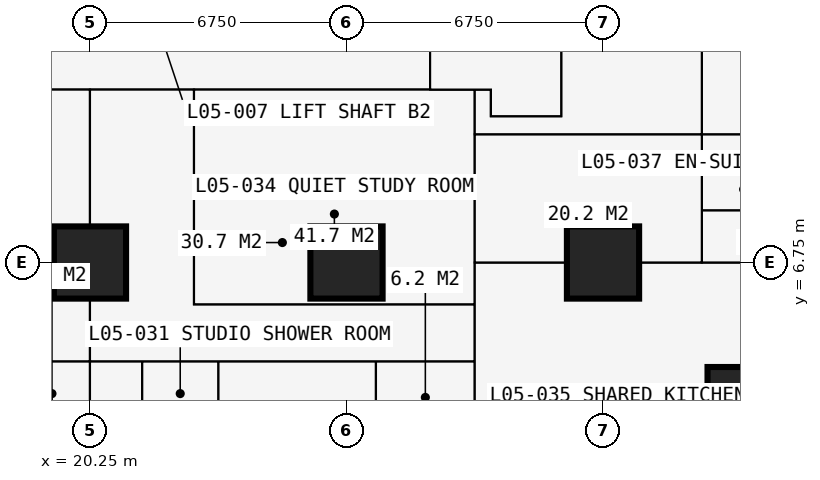
"""IFC4 building model, lengths in metres.
Left out: names, types, materials, properties, quantities, classifications, styles, units other than length and angle.
Written with IfcOpenShell. Run it as: python <this file> out.ifc"""

import sys

from ifc_helpers import new_model, si_unit, direction, frame, frame_2d, origin, origin_2d, place, context, subcontext, project, spatial, rectangle, extrude, element, fill, save


model = new_model("IFC4")
c1 = context("Model", 3, precision=1e-05, world=origin(), true_north=direction((0.0, 1.0)))
c2 = subcontext(c1, "Body", "Model", "MODEL_VIEW")
j1 = project(units=[si_unit("LENGTHUNIT", "METRE"), si_unit("PLANEANGLEUNIT", "RADIAN")], contexts=[c1])
p1 = place(None, origin())
s1 = spatial("IfcSite", under=j1, at=p1, CompositionType="ELEMENT")
p2 = place(p1, origin())
s2 = spatial("IfcBuilding", under=s1, at=p2, CompositionType="ELEMENT")
p3 = place(p2, frame((0.0, 0.0, 21.6)))
s3 = spatial("IfcBuildingStorey", under=s2, at=p3, CompositionType="ELEMENT", Elevation=21.6)
for number, where, z_axis, x_axis in (
    (1, (20.25, 6.75, 0.0), (0.0, 0.0, 1.0), (1.0, 0.0, 0.0)),
    (2, (27.0, 6.75, 0.0), (0.0, 0.0, 1.0), (1.0, 0.0, 0.0)),
    (3, (33.75, 6.75, 0.0), (0.0, 0.0, 1.0), (1.0, 0.0, 0.0)),
):
    element("IfcColumn", number, at=place(p3, frame(where, z_axis=z_axis, x_axis=x_axis)), inside=s3, PredefinedType="COLUMN", context=c2, shape_type="SweptSolid", body=[
        extrude(rectangle(XDim=1.9, YDim=1.9, at=origin_2d()), origin(), (0.0, 0.0, 1.0), 3.6),
    ])
p4 = place(p3, frame((37.125, 3.375, 0.0), z_axis=(0.0, 0.0, 1.0), x_axis=(1.0, 0.0, 0.0)))
e4 = element("IfcColumn", 4, at=p4, inside=s3, PredefinedType="COLUMN", context=c2, shape_type="SweptSolid", body=[
    extrude(rectangle(XDim=1.25, YDim=1.25, at=origin_2d()), origin(), (0.0, 0.0, 1.0), 3.6),
])
p5 = place(p3, frame((6.75, 4.15, 0.0), z_axis=(0.0, 0.0, 1.0), x_axis=(1.0, 0.0, 0.0)))
e5 = element("IfcWall", 5, at=p5, inside=s3, PredefinedType="PARTITIONING", context=c2, shape_type="SweptSolid", body=[
    extrude(rectangle(XDim=23.625, YDim=0.1, at=frame_2d((11.812, 0.0))), origin(), (0.0, 0.0, 1.0), 3.375),
])
p6 = place(p5, frame((0.2, 0.0, 0.0)))
e6 = element("IfcOpeningElement", 6, at=p6, cuts=e5, PredefinedType="OPENING", context=c2, shape_type="SweptSolid", body=[
    extrude(rectangle(XDim=0.95, YDim=2.2, at=frame_2d((0.475, 1.1))), frame((0.0, 0.06, 0.0), z_axis=(0.0, -1.0, 0.0), x_axis=(1.0, 0.0, 0.0)), (0.0, 0.0, 1.0), 0.12),
])
p7 = place(p5, frame((3.625, 0.0, 0.0)))
e7 = element("IfcOpeningElement", 7, at=p7, cuts=e5, PredefinedType="OPENING", context=c2, shape_type="SweptSolid", body=[
    extrude(rectangle(XDim=0.95, YDim=2.2, at=frame_2d((0.475, 1.1))), frame((0.0, 0.06, 0.0), z_axis=(0.0, -1.0, 0.0), x_axis=(1.0, 0.0, 0.0)), (0.0, 0.0, 1.0), 0.12),
])
p8 = place(p5, frame((7.0, 0.0, 0.0)))
e8 = element("IfcOpeningElement", 8, at=p8, cuts=e5, PredefinedType="OPENING", context=c2, shape_type="SweptSolid", body=[
    extrude(rectangle(XDim=0.95, YDim=2.2, at=frame_2d((0.475, 1.1))), frame((0.0, 0.06, 0.0), z_axis=(0.0, -1.0, 0.0), x_axis=(1.0, 0.0, 0.0)), (0.0, 0.0, 1.0), 0.12),
])
p9 = place(p5, frame((10.375, 0.0, 0.0)))
e9 = element("IfcOpeningElement", 9, at=p9, cuts=e5, PredefinedType="OPENING", context=c2, shape_type="SweptSolid", body=[
    extrude(rectangle(XDim=0.95, YDim=2.2, at=frame_2d((0.475, 1.1))), frame((0.0, 0.06, 0.0), z_axis=(0.0, -1.0, 0.0), x_axis=(1.0, 0.0, 0.0)), (0.0, 0.0, 1.0), 0.12),
])
p10 = place(p5, frame((18.475, 0.0, 0.0)))
e10 = element("IfcOpeningElement", 10, at=p10, cuts=e5, PredefinedType="OPENING", context=c2, shape_type="SweptSolid", body=[
    extrude(rectangle(XDim=0.95, YDim=2.2, at=frame_2d((0.475, 1.1))), frame((0.0, 0.06, 0.0), z_axis=(0.0, -1.0, 0.0), x_axis=(1.0, 0.0, 0.0)), (0.0, 0.0, 1.0), 0.12),
])
p11 = place(p5, frame((13.7, 0.0, 0.0)))
e11 = element("IfcOpeningElement", 11, at=p11, cuts=e5, PredefinedType="OPENING", context=c2, shape_type="SweptSolid", body=[
    extrude(rectangle(XDim=0.95, YDim=2.2, at=frame_2d((0.475, 1.1))), frame((0.0, 0.06, 0.0), z_axis=(0.0, -1.0, 0.0), x_axis=(1.0, 0.0, 0.0)), (0.0, 0.0, 1.0), 0.12),
])
p12 = place(p3, frame((10.125, 11.3, 0.0), z_axis=(0.0, 0.0, 1.0), x_axis=(1.0, 0.0, 0.0)))
e12 = element("IfcWall", 12, at=p12, inside=s3, PredefinedType="PARTITIONING", context=c2, shape_type="SweptSolid", body=[
    extrude(rectangle(XDim=20.675, YDim=0.15, at=frame_2d((10.337, 0.0))), origin(), (0.0, 0.0, 1.0), 3.375),
])
p13 = place(p12, frame((8.375, 0.0, 0.0)))
e13 = element("IfcOpeningElement", 13, at=p13, cuts=e12, PredefinedType="OPENING", context=c2, shape_type="SweptSolid", body=[
    extrude(rectangle(XDim=1.0, YDim=2.2, at=frame_2d((0.5, 1.1))), frame((0.0, 0.085, 0.0), z_axis=(0.0, -1.0, 0.0), x_axis=(1.0, 0.0, 0.0)), (0.0, 0.0, 1.0), 0.17),
])
p14 = place(p12, frame((10.975, 0.0, 0.0)))
e14 = element("IfcOpeningElement", 14, at=p14, cuts=e12, PredefinedType="OPENING", context=c2, shape_type="SweptSolid", body=[
    extrude(rectangle(XDim=1.0, YDim=2.2, at=frame_2d((0.5, 1.1))), frame((0.0, 0.085, 0.0), z_axis=(0.0, -1.0, 0.0), x_axis=(1.0, 0.0, 0.0)), (0.0, 0.0, 1.0), 0.17),
])
p15 = place(p12, frame((3.925, 0.0, 0.0)))
e15 = element("IfcOpeningElement", 15, at=p15, cuts=e12, PredefinedType="OPENING", context=c2, shape_type="SweptSolid", body=[
    extrude(rectangle(XDim=0.95, YDim=2.2, at=frame_2d((0.475, 1.1))), frame((0.0, 0.085, 0.0), z_axis=(0.0, -1.0, 0.0), x_axis=(1.0, 0.0, 0.0)), (0.0, 0.0, 1.0), 0.17),
])
p16 = place(p3, frame((20.25, -0.734, 0.0), z_axis=(0.0, 0.0, 1.0), x_axis=(0.0, 1.0, 0.0)))
e16 = element("IfcWall", 16, at=p16, inside=s3, PredefinedType="PARTITIONING", context=c2, shape_type="SweptSolid", body=[
    extrude(rectangle(XDim=12.034, YDim=0.15, at=frame_2d((6.017, 0.0))), origin(), (0.0, 0.0, 1.0), 2.61),
])
p17 = place(p3, frame((21.625, 1.95, 0.0), z_axis=(0.0, 0.0, 1.0), x_axis=(0.0, 1.0, 0.0)))
e17 = element("IfcWall", 17, at=p17, inside=s3, PredefinedType="PARTITIONING", context=c2, shape_type="SweptSolid", body=[
    extrude(rectangle(XDim=2.2, YDim=0.1, at=frame_2d((1.1, 0.0))), origin(), (0.0, 0.0, 1.0), 3.375),
])
p18 = place(p3, frame((22.988, 5.65, 0.0), z_axis=(0.0, 0.0, 1.0), x_axis=(1.0, 0.0, 0.0)))
e18 = element("IfcWall", 18, at=p18, inside=s3, PredefinedType="PARTITIONING", context=c2, shape_type="SweptSolid", body=[
    extrude(rectangle(XDim=7.387, YDim=0.15, at=frame_2d((3.694, 0.0))), origin(), (0.0, 0.0, 1.0), 3.375),
])
p19 = place(p18, frame((2.1, 0.0, 0.0)))
e19 = element("IfcOpeningElement", 19, at=p19, cuts=e18, PredefinedType="OPENING", context=c2, shape_type="SweptSolid", body=[
    extrude(rectangle(XDim=0.95, YDim=2.2, at=frame_2d((0.475, 1.1))), frame((0.0, 0.085, 0.0), z_axis=(0.0, -1.0, 0.0), x_axis=(1.0, 0.0, 0.0)), (0.0, 0.0, 1.0), 0.17),
])
p20 = place(p3, frame((22.988, 5.65, 0.0), z_axis=(0.0, 0.0, 1.0), x_axis=(0.0, 1.0, 0.0)))
e20 = element("IfcWall", 20, at=p20, inside=s3, PredefinedType="PARTITIONING", context=c2, shape_type="SweptSolid", body=[
    extrude(rectangle(XDim=5.65, YDim=0.15, at=frame_2d((2.825, 0.0))), origin(), (0.0, 0.0, 1.0), 3.375),
])
p21 = place(p3, frame((23.625, -0.734, 0.0), z_axis=(0.0, 0.0, 1.0), x_axis=(0.0, 1.0, 0.0)))
e21 = element("IfcWall", 21, at=p21, inside=s3, PredefinedType="PARTITIONING", context=c2, shape_type="SweptSolid", body=[
    extrude(rectangle(XDim=4.884, YDim=0.175, at=frame_2d((2.442, 0.0))), origin(), (0.0, 0.0, 1.0), 3.375),
])
p22 = place(p21, frame((3.334, 0.0, 0.0)))
e22 = element("IfcOpeningElement", 22, at=p22, cuts=e21, PredefinedType="OPENING", context=c2, shape_type="SweptSolid", body=[
    extrude(rectangle(XDim=0.9, YDim=2.2, at=frame_2d((0.45, 1.1))), frame((0.0, 0.097, 0.0), z_axis=(0.0, -1.0, 0.0), x_axis=(1.0, 0.0, 0.0)), (0.0, 0.0, 1.0), 0.195),
])
p23 = place(p3, frame((27.775, 1.75, 0.0), z_axis=(0.0, 0.0, 1.0), x_axis=(0.0, 1.0, 0.0)))
e23 = element("IfcWall", 23, at=p23, inside=s3, PredefinedType="PARTITIONING", context=c2, shape_type="SweptSolid", body=[
    extrude(rectangle(XDim=2.4, YDim=0.1, at=frame_2d((1.2, 0.0))), origin(), (0.0, 0.0, 1.0), 3.375),
])
p24 = place(p3, frame((29.2, 11.3, 0.0), z_axis=(0.0, 0.0, 1.0), x_axis=(0.0, 1.0, 0.0)))
e24 = element("IfcWall", 24, at=p24, inside=s3, PredefinedType="PARTITIONING", context=c2, shape_type="SweptSolid", body=[
    extrude(rectangle(XDim=17.9, YDim=0.2, at=frame_2d((8.95, 0.0))), origin(), (0.0, 0.0, 1.0), 3.375),
])
p25 = place(p24, frame((8.35, 0.0, 0.0)))
e25 = element("IfcOpeningElement", 25, at=p25, cuts=e24, PredefinedType="OPENING", context=c2, shape_type="SweptSolid", body=[
    extrude(rectangle(XDim=1.2, YDim=2.2, at=frame_2d((0.6, 1.1))), frame((0.0, 0.11, 0.0), z_axis=(0.0, -1.0, 0.0), x_axis=(1.0, 0.0, 0.0)), (0.0, 0.0, 1.0), 0.22),
])
p26 = place(p3, frame((30.375, -0.734, 0.0), z_axis=(0.0, 0.0, 1.0), x_axis=(0.0, 1.0, 0.0)))
e26 = element("IfcWall", 26, at=p26, inside=s3, PredefinedType="PARTITIONING", context=c2, shape_type="SweptSolid", body=[
    extrude(rectangle(XDim=12.034, YDim=0.15, at=frame_2d((6.017, 0.0))), origin(), (0.0, 0.0, 1.0), 3.375),
])
p27 = place(p3, frame((30.375, 6.75, 0.0), z_axis=(0.0, 0.0, 1.0), x_axis=(1.0, 0.0, 0.0)))
e27 = element("IfcWall", 27, at=p27, inside=s3, PredefinedType="PARTITIONING", context=c2, shape_type="SweptSolid", body=[
    extrude(rectangle(XDim=10.859, YDim=0.15, at=frame_2d((5.429, 0.0))), origin(), (0.0, 0.0, 1.0), 2.877),
])
p28 = place(p27, frame((1.4, 0.0, 0.0)))
e28 = element("IfcOpeningElement", 28, at=p28, cuts=e27, PredefinedType="OPENING", context=c2, shape_type="SweptSolid", body=[
    extrude(rectangle(XDim=1.0, YDim=2.2, at=frame_2d((0.5, 1.1))), frame((0.0, 0.085, 0.0), z_axis=(0.0, -1.0, 0.0), x_axis=(1.0, 0.0, 0.0)), (0.0, 0.0, 1.0), 0.17),
])
p29 = place(p3, frame((30.375, 10.125, 0.0), z_axis=(0.0, 0.0, 1.0), x_axis=(1.0, 0.0, 0.0)))
e29 = element("IfcWall", 29, at=p29, inside=s3, PredefinedType="PARTITIONING", context=c2, shape_type="SweptSolid", body=[
    extrude(rectangle(XDim=10.859, YDim=0.15, at=frame_2d((5.429, 0.0))), origin(), (0.0, 0.0, 1.0), 3.375),
])
p30 = place(p29, frame((2.5, 0.0, 0.0)))
e30 = element("IfcOpeningElement", 30, at=p30, cuts=e29, PredefinedType="OPENING", context=c2, shape_type="SweptSolid", body=[
    extrude(rectangle(XDim=1.0, YDim=2.2, at=frame_2d((0.5, 1.1))), frame((0.0, 0.085, 0.0), z_axis=(0.0, -1.0, 0.0), x_axis=(1.0, 0.0, 0.0)), (0.0, 0.0, 1.0), 0.17),
])
p31 = place(p3, frame((30.8, 10.6, 0.0), z_axis=(0.0, 0.0, 1.0), x_axis=(0.0, 1.0, 0.0)))
e31 = element("IfcWall", 31, at=p31, inside=s3, PredefinedType="PARTITIONING", context=c2, shape_type="SweptSolid", body=[
    extrude(rectangle(XDim=0.7, YDim=0.15, at=frame_2d((0.35, 0.0))), origin(), (0.0, 0.0, 1.0), 3.375),
])
p32 = place(p3, frame((30.8, 10.6, 0.0), z_axis=(0.0, 0.0, 1.0), x_axis=(1.0, 0.0, 0.0)))
e32 = element("IfcWall", 32, at=p32, inside=s3, PredefinedType="PARTITIONING", context=c2, shape_type="SweptSolid", body=[
    extrude(rectangle(XDim=1.85, YDim=0.15, at=frame_2d((0.925, 0.0))), origin(), (0.0, 0.0, 1.0), 3.375),
])
p33 = place(p3, frame((32.65, 10.6, 0.0), z_axis=(0.0, 0.0, 1.0), x_axis=(0.0, 1.0, 0.0)))
e33 = element("IfcWall", 33, at=p33, inside=s3, PredefinedType="SHEAR", context=c2, shape_type="SweptSolid", body=[
    extrude(rectangle(XDim=9.3, YDim=0.1, at=frame_2d((4.65, 0.0))), origin(), (0.0, 0.0, 1.0), 3.375),
])
p34 = place(p33, frame((0.5, 0.0, 0.0)))
e34 = element("IfcOpeningElement", 34, at=p34, cuts=e33, PredefinedType="OPENING", context=c2, shape_type="SweptSolid", body=[
    extrude(rectangle(XDim=1.0, YDim=2.2, at=frame_2d((0.5, 1.1))), frame((0.0, 0.06, 0.0), z_axis=(0.0, -1.0, 0.0), x_axis=(1.0, 0.0, 0.0)), (0.0, 0.0, 1.0), 0.12),
])
p35 = place(p3, frame((36.35, 6.75, 0.0), z_axis=(0.0, 0.0, 1.0), x_axis=(0.0, 1.0, 0.0)))
e35 = element("IfcWall", 35, at=p35, inside=s3, PredefinedType="PARTITIONING", context=c2, shape_type="SweptSolid", body=[
    extrude(rectangle(XDim=23.625, YDim=0.15, at=frame_2d((11.812, 0.0))), origin(), (0.0, 0.0, 1.0), 3.375),
])
p36 = place(p35, frame((0.2, 0.0, 0.0)))
e36 = element("IfcOpeningElement", 36, at=p36, cuts=e35, PredefinedType="OPENING", context=c2, shape_type="SweptSolid", body=[
    extrude(rectangle(XDim=0.95, YDim=2.2, at=frame_2d((0.475, 1.1))), frame((0.0, 0.085, 0.0), z_axis=(0.0, -1.0, 0.0), x_axis=(1.0, 0.0, 0.0)), (0.0, 0.0, 1.0), 0.17),
])
p37 = place(p35, frame((18.475, 0.0, 0.0)))
e37 = element("IfcOpeningElement", 37, at=p37, cuts=e35, PredefinedType="OPENING", context=c2, shape_type="SweptSolid", body=[
    extrude(rectangle(XDim=0.95, YDim=2.2, at=frame_2d((0.475, 1.1))), frame((0.0, 0.085, 0.0), z_axis=(0.0, -1.0, 0.0), x_axis=(1.0, 0.0, 0.0)), (0.0, 0.0, 1.0), 0.17),
])
p38 = place(p35, frame((11.725, 0.0, 0.0)))
e38 = element("IfcOpeningElement", 38, at=p38, cuts=e35, PredefinedType="OPENING", context=c2, shape_type="SweptSolid", body=[
    extrude(rectangle(XDim=0.95, YDim=2.2, at=frame_2d((0.475, 1.1))), frame((0.0, 0.085, 0.0), z_axis=(0.0, -1.0, 0.0), x_axis=(1.0, 0.0, 0.0)), (0.0, 0.0, 1.0), 0.17),
])
p39 = place(p35, frame((4.975, 0.0, 0.0)))
e39 = element("IfcOpeningElement", 39, at=p39, cuts=e35, PredefinedType="OPENING", context=c2, shape_type="SweptSolid", body=[
    extrude(rectangle(XDim=0.95, YDim=2.2, at=frame_2d((0.475, 1.1))), frame((0.0, 0.085, 0.0), z_axis=(0.0, -1.0, 0.0), x_axis=(1.0, 0.0, 0.0)), (0.0, 0.0, 1.0), 0.17),
])
p40 = place(p3, frame((36.35, 8.125, 0.0), z_axis=(0.0, 0.0, 1.0), x_axis=(1.0, 0.0, 0.0)))
e40 = element("IfcWall", 40, at=p40, inside=s3, PredefinedType="PARTITIONING", context=c2, shape_type="SweptSolid", body=[
    extrude(rectangle(XDim=2.2, YDim=0.1, at=frame_2d((1.1, 0.0))), origin(), (0.0, 0.0, 1.0), 3.375),
])
p41 = place(p40, frame((0.65, 0.0, 0.0)))
e41 = element("IfcOpeningElement", 41, at=p41, cuts=e40, PredefinedType="OPENING", context=c2, shape_type="SweptSolid", body=[
    extrude(rectangle(XDim=0.9, YDim=2.2, at=frame_2d((0.45, 1.1))), frame((0.0, 0.06, 0.0), z_axis=(0.0, -1.0, 0.0), x_axis=(1.0, 0.0, 0.0)), (0.0, 0.0, 1.0), 0.12),
])
p42 = place(p13, origin())
e42 = element("IfcDoor", 42, at=p42, inside=s3, OperationType="SINGLE_SWING_LEFT", PredefinedType="DOOR", context=c2, shape_type="SweptSolid", body=[
    extrude(rectangle(XDim=1.0, YDim=2.2, at=frame_2d((0.5, 1.1))), frame((0.0, 0.025, 0.0), z_axis=(0.0, -1.0, 0.0), x_axis=(1.0, 0.0, 0.0)), (0.0, 0.0, 1.0), 0.05),
])
fill(e13, e42)
p43 = place(p10, origin())
e43 = element("IfcDoor", 43, at=p43, inside=s3, OperationType="SINGLE_SWING_LEFT", PredefinedType="DOOR", context=c2, shape_type="SweptSolid", body=[
    extrude(rectangle(XDim=0.95, YDim=2.2, at=frame_2d((0.475, 1.1))), frame((0.0, 0.025, 0.0), z_axis=(0.0, -1.0, 0.0), x_axis=(1.0, 0.0, 0.0)), (0.0, 0.0, 1.0), 0.05),
])
fill(e10, e43)
p44 = place(p11, origin())
e44 = element("IfcDoor", 44, at=p44, inside=s3, OperationType="SINGLE_SWING_LEFT", PredefinedType="DOOR", context=c2, shape_type="SweptSolid", body=[
    extrude(rectangle(XDim=0.95, YDim=2.2, at=frame_2d((0.475, 1.1))), frame((0.0, 0.025, 0.0), z_axis=(0.0, -1.0, 0.0), x_axis=(1.0, 0.0, 0.0)), (0.0, 0.0, 1.0), 0.05),
])
fill(e11, e44)
p45 = place(p22, origin())
e45 = element("IfcDoor", 45, at=p45, inside=s3, OperationType="SINGLE_SWING_RIGHT", PredefinedType="DOOR", context=c2, shape_type="SweptSolid", body=[
    extrude(rectangle(XDim=0.9, YDim=2.2, at=frame_2d((0.45, 1.1))), frame((0.0, 0.025, 0.0), z_axis=(0.0, -1.0, 0.0), x_axis=(1.0, 0.0, 0.0)), (0.0, 0.0, 1.0), 0.05),
])
fill(e22, e45)
p46 = place(p14, origin())
e46 = element("IfcDoor", 46, at=p46, inside=s3, OperationType="SINGLE_SWING_LEFT", PredefinedType="DOOR", context=c2, shape_type="SweptSolid", body=[
    extrude(rectangle(XDim=1.0, YDim=2.2, at=frame_2d((0.5, 1.1))), frame((0.0, 0.025, 0.0), z_axis=(0.0, -1.0, 0.0), x_axis=(1.0, 0.0, 0.0)), (0.0, 0.0, 1.0), 0.05),
])
fill(e14, e46)
p47 = place(p19, origin())
e47 = element("IfcDoor", 47, at=p47, inside=s3, OperationType="SINGLE_SWING_LEFT", PredefinedType="DOOR", context=c2, shape_type="SweptSolid", body=[
    extrude(rectangle(XDim=0.95, YDim=2.2, at=frame_2d((0.475, 1.1))), frame((0.0, 0.025, 0.0), z_axis=(0.0, -1.0, 0.0), x_axis=(1.0, 0.0, 0.0)), (0.0, 0.0, 1.0), 0.05),
])
fill(e19, e47)
p48 = place(p28, origin())
e48 = element("IfcDoor", 48, at=p48, inside=s3, OperationType="SINGLE_SWING_LEFT", PredefinedType="DOOR", context=c2, shape_type="SweptSolid", body=[
    extrude(rectangle(XDim=1.0, YDim=2.2, at=frame_2d((0.5, 1.1))), frame((0.0, 0.025, 0.0), z_axis=(0.0, -1.0, 0.0), x_axis=(1.0, 0.0, 0.0)), (0.0, 0.0, 1.0), 0.05),
])
fill(e28, e48)
p49 = place(p36, origin())
e49 = element("IfcDoor", 49, at=p49, inside=s3, OperationType="SINGLE_SWING_LEFT", PredefinedType="DOOR", context=c2, shape_type="SweptSolid", body=[
    extrude(rectangle(XDim=0.95, YDim=2.2, at=frame_2d((0.475, 1.1))), frame((0.0, 0.025, 0.0), z_axis=(0.0, -1.0, 0.0), x_axis=(1.0, 0.0, 0.0)), (0.0, 0.0, 1.0), 0.05),
])
fill(e36, e49)
p50 = place(p41, origin())
e50 = element("IfcDoor", 50, at=p50, inside=s3, OperationType="SINGLE_SWING_RIGHT", PredefinedType="DOOR", context=c2, shape_type="SweptSolid", body=[
    extrude(rectangle(XDim=0.9, YDim=2.2, at=frame_2d((0.45, 1.1))), frame((0.0, 0.025, 0.0), z_axis=(0.0, -1.0, 0.0), x_axis=(1.0, 0.0, 0.0)), (0.0, 0.0, 1.0), 0.05),
])
fill(e41, e50)
p51 = place(p30, origin())
e51 = element("IfcDoor", 51, at=p51, inside=s3, OperationType="SINGLE_SWING_LEFT", PredefinedType="DOOR", context=c2, shape_type="SweptSolid", body=[
    extrude(rectangle(XDim=1.0, YDim=2.2, at=frame_2d((0.5, 1.1))), frame((0.0, 0.025, 0.0), z_axis=(0.0, -1.0, 0.0), x_axis=(1.0, 0.0, 0.0)), (0.0, 0.0, 1.0), 0.05),
])
fill(e30, e51)
p52 = place(p39, origin())
e52 = element("IfcDoor", 52, at=p52, inside=s3, OperationType="SINGLE_SWING_LEFT", PredefinedType="DOOR", context=c2, shape_type="SweptSolid", body=[
    extrude(rectangle(XDim=0.95, YDim=2.2, at=frame_2d((0.475, 1.1))), frame((0.0, 0.025, 0.0), z_axis=(0.0, -1.0, 0.0), x_axis=(1.0, 0.0, 0.0)), (0.0, 0.0, 1.0), 0.05),
])
fill(e39, e52)
p53 = place(p34, origin())
e53 = element("IfcDoor", 53, at=p53, inside=s3, OperationType="SINGLE_SWING_LEFT", PredefinedType="DOOR", context=c2, shape_type="SweptSolid", body=[
    extrude(rectangle(XDim=1.0, YDim=2.2, at=frame_2d((0.5, 1.1))), frame((0.0, 0.025, 0.0), z_axis=(0.0, -1.0, 0.0), x_axis=(1.0, 0.0, 0.0)), (0.0, 0.0, 1.0), 0.05),
])
fill(e34, e53)
save(model, sys.argv[1])
